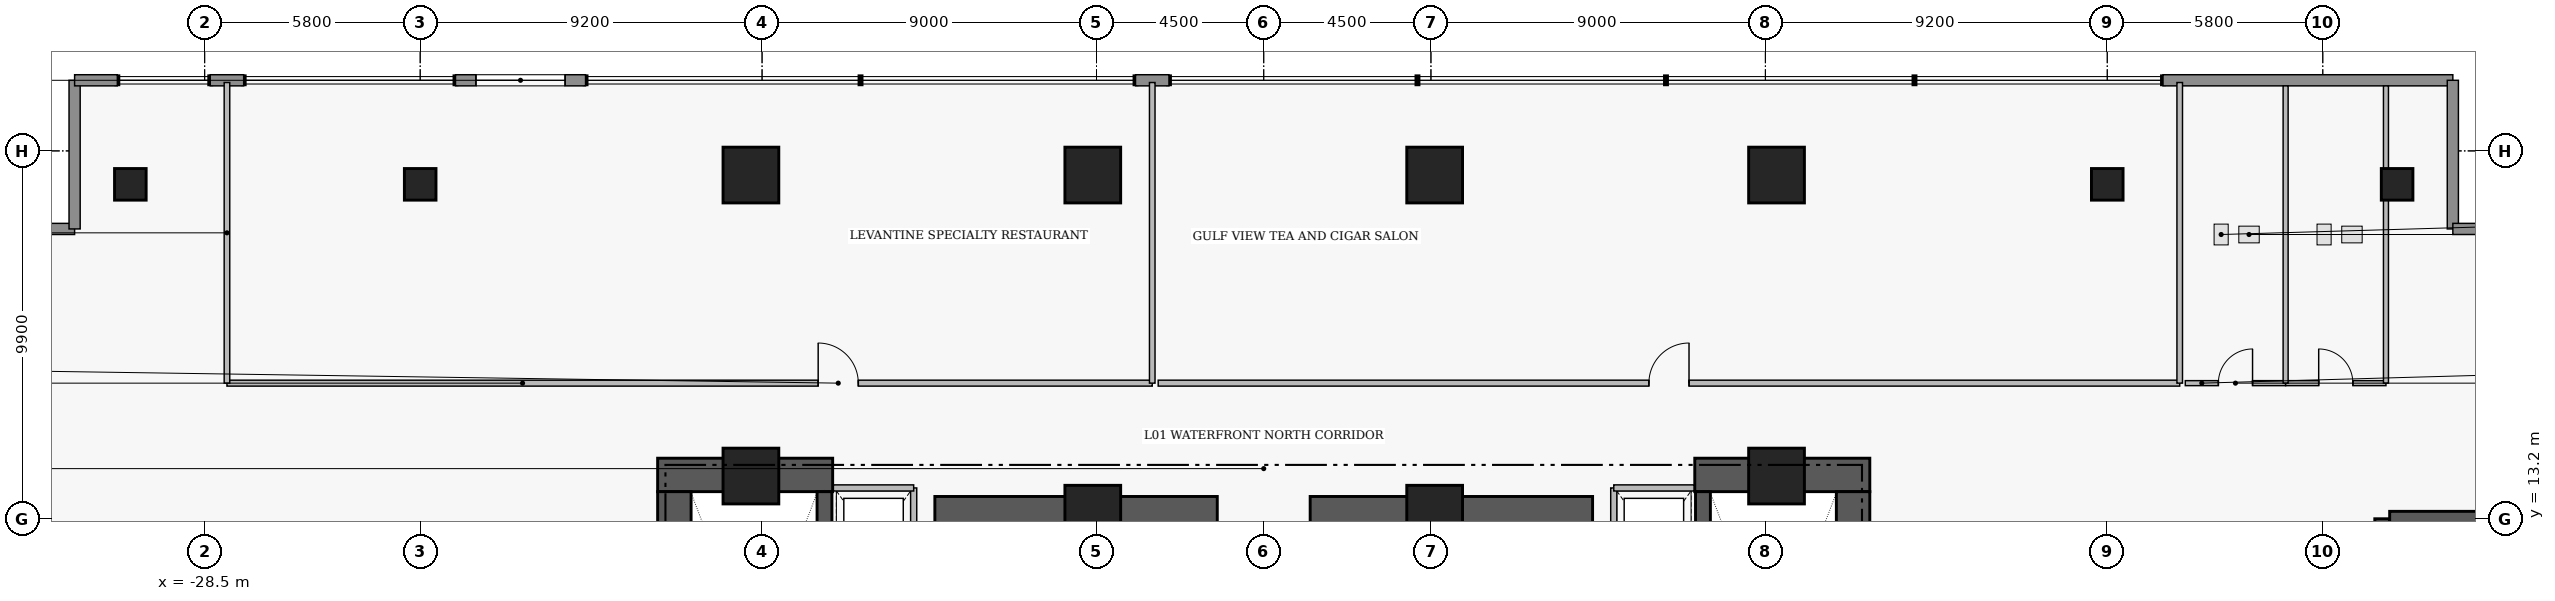
"""IFC4 building model, lengths in metres.
Left out: names, types, materials, properties, quantities, classifications, styles, units other than length and angle.
Written with IfcOpenShell. Run it as: python <this file> out.ifc"""

import sys

from ifc_helpers import new_model, si_unit, direction, frame, frame_2d, origin, origin_2d, place, context, subcontext, project, spatial, rectangle, extrude, element, fill, save


model = new_model("IFC4")
c1 = context("Model", 3, precision=1e-05, world=origin(), true_north=direction((0.0, 1.0)))
c2 = subcontext(c1, "Body", "Model", "MODEL_VIEW")
j1 = project(units=[si_unit("LENGTHUNIT", "METRE"), si_unit("PLANEANGLEUNIT", "RADIAN")], contexts=[c1])
p1 = place(None, origin())
s1 = spatial("IfcSite", under=j1, at=p1, CompositionType="ELEMENT")
p2 = place(p1, origin())
s2 = spatial("IfcBuilding", under=s1, at=p2, CompositionType="ELEMENT")
p3 = place(p2, frame((0.0, 0.0, 6.0)))
s3 = spatial("IfcBuildingStorey", under=s2, at=p3, CompositionType="ELEMENT", Elevation=6.0)
for number, where, z_axis, x_axis in (
    (1, (-16.31, 14.38, 0.0), (0.0, 0.0, 1.0), (1.0, 0.0, 0.0)),
    (2, (11.6, 14.38, 0.0), (0.0, 0.0, 1.0), (1.0, 0.0, 0.0)),
):
    element("IfcWall", number, at=place(p3, frame(where, z_axis=z_axis, x_axis=x_axis)), inside=s3, PredefinedType="SHEAR", context=c2, shape_type="SweptSolid", body=[
        extrude(rectangle(XDim=4.71, YDim=0.9, at=frame_2d((2.355, 0.0))), origin(), (0.0, 0.0, 1.0), 5.21),
    ])
for number, where, z_axis, x_axis in (
    (3, (-15.86, 4.97, 0.0), (0.0, 0.0, 1.0), (0.0, 1.0, 0.0)),
    (4, (15.86, 4.97, 0.0), (0.0, 0.0, 1.0), (0.0, 1.0, 0.0)),
):
    element("IfcWall", number, at=place(p3, frame(where, z_axis=z_axis, x_axis=x_axis)), inside=s3, PredefinedType="SHEAR", context=c2, shape_type="SweptSolid", body=[
        extrude(rectangle(XDim=8.96, YDim=0.9, at=frame_2d((4.48, 0.0))), origin(), (0.0, 0.0, 1.0), 5.21),
    ])
for number, where, z_axis, x_axis in (
    (5, (-8.85, 13.35, 0.0), (0.0, 0.0, 1.0), (1.0, 0.0, 0.0)),
    (6, (1.25, 13.35, 0.0), (0.0, 0.0, 1.0), (1.0, 0.0, 0.0)),
):
    element("IfcWall", number, at=place(p3, frame(where, z_axis=z_axis, x_axis=x_axis)), inside=s3, PredefinedType="SHEAR", context=c2, shape_type="SweptSolid", body=[
        extrude(rectangle(XDim=7.6, YDim=0.9, at=frame_2d((3.8, 0.0))), origin(), (0.0, 0.0, 1.0), 5.14),
    ])
p4 = place(p3, frame((-11.82, 4.97, 0.0), z_axis=(0.0, 0.0, 1.0), x_axis=(0.0, 1.0, 0.0)))
e7 = element("IfcWall", 7, at=p4, inside=s3, PredefinedType="SHEAR", context=c2, shape_type="SweptSolid", body=[
    extrude(rectangle(XDim=8.96, YDim=0.4, at=frame_2d((4.48, 0.0))), origin(), (0.0, 0.0, 1.0), 5.21),
])
p5 = place(p4, frame((0.31, 0.0, 0.0)))
e8 = element("IfcOpeningElement", 8, at=p5, cuts=e7, PredefinedType="OPENING", context=c2, shape_type="SweptSolid", body=[
    extrude(rectangle(XDim=1.12, YDim=2.22, at=frame_2d((0.56, 1.11))), frame((0.0, 0.21, 0.0), z_axis=(0.0, -1.0, 0.0), x_axis=(1.0, 0.0, 0.0)), (0.0, 0.0, 1.0), 0.42),
])
p6 = place(p3, frame((11.82, 13.93, 0.0), z_axis=(0.0, 0.0, 1.0), x_axis=(0.0, -1.0, 0.0)))
e9 = element("IfcWall", 9, at=p6, inside=s3, PredefinedType="SHEAR", context=c2, shape_type="SweptSolid", body=[
    extrude(rectangle(XDim=8.96, YDim=0.4, at=frame_2d((4.48, 0.0))), origin(), (0.0, 0.0, 1.0), 5.21),
])
p7 = place(p6, frame((7.53, 0.0, 0.0)))
e10 = element("IfcOpeningElement", 10, at=p7, cuts=e9, PredefinedType="OPENING", context=c2, shape_type="SweptSolid", body=[
    extrude(rectangle(XDim=1.12, YDim=2.22, at=frame_2d((0.56, 1.11))), frame((0.0, 0.21, 0.0), z_axis=(0.0, -1.0, 0.0), x_axis=(1.0, 0.0, 0.0)), (0.0, 0.0, 1.0), 0.42),
])
p8 = place(p3, frame((30.1, 13.2, 0.0), z_axis=(0.0, 0.0, 1.0), x_axis=(0.0, -1.0, 0.0)))
e11 = element("IfcWall", 11, at=p8, inside=s3, PredefinedType="SHEAR", context=c2, shape_type="SweptSolid", body=[
    extrude(rectangle(XDim=11.8, YDim=0.4, at=frame_2d((5.9, 0.0))), origin(), (0.0, 0.0, 1.0), 5.21),
])
p9 = place(p8, frame((9.7, 0.0, 0.0)))
e12 = element("IfcOpeningElement", 12, at=p9, cuts=e11, PredefinedType="OPENING", context=c2, shape_type="SweptSolid", body=[
    extrude(rectangle(XDim=1.12, YDim=2.22, at=frame_2d((0.56, 1.11))), frame((0.0, 0.21, 0.0), z_axis=(0.0, -1.0, 0.0), x_axis=(1.0, 0.0, 0.0)), (0.0, 0.0, 1.0), 0.42),
])
p10 = place(p3, frame((30.3, 13.2, 0.0), z_axis=(0.0, 0.0, 1.0), x_axis=(1.0, 0.0, 0.0)))
e13 = element("IfcWall", 13, at=p10, inside=s3, PredefinedType="SHEAR", context=c2, shape_type="SweptSolid", body=[
    extrude(rectangle(XDim=5.35, YDim=0.4, at=frame_2d((2.675, 0.0))), origin(), (0.0, 0.0, 1.0), 5.21),
])
for number, where, z_axis, x_axis in (
    (14, (-13.8, 14.35, 0.0), (0.0, 0.0, 1.0), (1.0, 0.0, 0.0)),
    (15, (-4.6, 13.35, 0.0), (0.0, 0.0, 1.0), (1.0, 0.0, 0.0)),
    (16, (4.6, 13.35, 0.0), (0.0, 0.0, 1.0), (1.0, 0.0, 0.0)),
    (17, (13.8, 14.35, 0.0), (0.0, 0.0, 1.0), (1.0, 0.0, 0.0)),
    (18, (-13.8, 22.45, 0.0), (0.0, 0.0, 1.0), (1.0, 0.0, 0.0)),
    (19, (-4.6, 22.45, 0.0), (0.0, 0.0, 1.0), (1.0, 0.0, 0.0)),
    (20, (4.6, 22.45, 0.0), (0.0, 0.0, 1.0), (1.0, 0.0, 0.0)),
    (21, (13.8, 22.45, 0.0), (0.0, 0.0, 1.0), (1.0, 0.0, 0.0)),
):
    element("IfcColumn", number, at=place(p3, frame(where, z_axis=z_axis, x_axis=x_axis)), inside=s3, PredefinedType="COLUMN", context=c2, shape_type="SweptSolid", body=[
        extrude(rectangle(XDim=1.5, YDim=1.5, at=origin_2d()), origin(), (0.0, 0.0, 1.0), 5.4),
    ])
for number, where, z_axis, x_axis in (
    (22, (-30.5, 22.2, 0.0), (0.0, 0.0, 1.0), (1.0, 0.0, 0.0)),
    (23, (30.5, 22.2, 0.0), (0.0, 0.0, 1.0), (1.0, 0.0, 0.0)),
    (24, (-22.7, 22.2, 0.0), (0.0, 0.0, 1.0), (1.0, 0.0, 0.0)),
    (25, (22.7, 22.2, 0.0), (0.0, 0.0, 1.0), (1.0, 0.0, 0.0)),
):
    element("IfcColumn", number, at=place(p3, frame(where, z_axis=z_axis, x_axis=x_axis)), inside=s3, PredefinedType="COLUMN", context=c2, shape_type="SweptSolid", body=[
        extrude(rectangle(XDim=0.85, YDim=0.85, at=origin_2d()), origin(), (0.0, 0.0, 1.0), 5.4),
    ])
for number, where, z_axis, x_axis in (
    (26, (-36.0, 21.0, 0.0), (0.0, 0.0, 1.0), (1.0, 0.0, 0.0)),
    (27, (-32.0, 21.0, 0.0), (0.0, 0.0, 1.0), (0.0, 1.0, 0.0)),
):
    element("IfcWall", number, at=place(p3, frame(where, z_axis=z_axis, x_axis=x_axis)), inside=s3, PredefinedType="STANDARD", context=c2, shape_type="SweptSolid", body=[
        extrude(rectangle(XDim=4.0, YDim=0.3, at=frame_2d((2.0, 0.0))), origin(), (0.0, 0.0, 1.0), 5.14),
    ])
p11 = place(p3, frame((-32.0, 25.0, 0.0), z_axis=(0.0, 0.0, 1.0), x_axis=(1.0, 0.0, 0.0)))
e28 = element("IfcWall", 28, at=p11, inside=s3, PredefinedType="STANDARD", context=c2, shape_type="SweptSolid", body=[
    extrude(rectangle(XDim=1.15, YDim=0.3, at=frame_2d((0.575, 0.0))), origin(), (0.0, 0.0, 1.0), 5.14),
])
p12 = place(p3, frame((-28.35, 25.0, 0.0), z_axis=(0.0, 0.0, 1.0), x_axis=(1.0, 0.0, 0.0)))
e29 = element("IfcWall", 29, at=p12, inside=s3, PredefinedType="STANDARD", context=c2, shape_type="SweptSolid", body=[
    extrude(rectangle(XDim=0.9, YDim=0.3, at=frame_2d((0.45, 0.0))), origin(), (0.0, 0.0, 1.0), 5.14),
])
p13 = place(p3, frame((-21.75, 25.0, 0.0), z_axis=(0.0, 0.0, 1.0), x_axis=(1.0, 0.0, 0.0)))
e30 = element("IfcWall", 30, at=p13, inside=s3, PredefinedType="STANDARD", context=c2, shape_type="SweptSolid", body=[
    extrude(rectangle(XDim=3.5, YDim=0.3, at=frame_2d((1.75, 0.0))), origin(), (0.0, 0.0, 1.0), 5.14),
])
p14 = place(p13, frame((0.55, 0.0, 0.9)))
e31 = element("IfcOpeningElement", 31, at=p14, cuts=e30, PredefinedType="OPENING", context=c2, shape_type="SweptSolid", body=[
    extrude(rectangle(XDim=2.4, YDim=2.2, at=frame_2d((1.2, 1.1))), frame((0.0, 0.16, 0.0), z_axis=(0.0, -1.0, 0.0), x_axis=(1.0, 0.0, 0.0)), (0.0, 0.0, 1.0), 0.32),
])
p15 = place(p3, frame((-3.45, 25.0, 0.0), z_axis=(0.0, 0.0, 1.0), x_axis=(1.0, 0.0, 0.0)))
e32 = element("IfcWall", 32, at=p15, inside=s3, PredefinedType="STANDARD", context=c2, shape_type="SweptSolid", body=[
    extrude(rectangle(XDim=0.9, YDim=0.3, at=frame_2d((0.45, 0.0))), origin(), (0.0, 0.0, 1.0), 5.14),
])
p16 = place(p3, frame((24.2, 25.0, 0.0), z_axis=(0.0, 0.0, 1.0), x_axis=(1.0, 0.0, 0.0)))
e33 = element("IfcWall", 33, at=p16, inside=s3, PredefinedType="STANDARD", context=c2, shape_type="SweptSolid", body=[
    extrude(rectangle(XDim=7.8, YDim=0.3, at=frame_2d((3.9, 0.0))), origin(), (0.0, 0.0, 1.0), 5.14),
])
for number, where, z_axis, x_axis in (
    (34, (32.0, 25.0, 0.0), (0.0, 0.0, 1.0), (0.0, -1.0, 0.0)),
    (35, (32.0, 21.0, 0.0), (0.0, 0.0, 1.0), (1.0, 0.0, 0.0)),
):
    element("IfcWall", number, at=place(p3, frame(where, z_axis=z_axis, x_axis=x_axis)), inside=s3, PredefinedType="STANDARD", context=c2, shape_type="SweptSolid", body=[
        extrude(rectangle(XDim=4.0, YDim=0.3, at=frame_2d((2.0, 0.0))), origin(), (0.0, 0.0, 1.0), 5.14),
    ])
p17 = place(p3, frame((-27.9, 16.85, 0.0), z_axis=(0.0, 0.0, 1.0), x_axis=(1.0, 0.0, 0.0)))
e36 = element("IfcWall", 36, at=p17, inside=s3, PredefinedType="PARTITIONING", context=c2, shape_type="SweptSolid", body=[
    extrude(rectangle(XDim=24.9, YDim=0.16, at=frame_2d((12.45, 0.0))), origin(), (0.0, 0.0, 1.0), 4.607),
])
p18 = place(p17, frame((15.91, 0.0, 0.0)))
e37 = element("IfcOpeningElement", 37, at=p18, cuts=e36, PredefinedType="OPENING", context=c2, shape_type="SweptSolid", body=[
    extrude(rectangle(XDim=1.08, YDim=2.18, at=frame_2d((0.54, 1.09))), frame((0.0, 0.09, 0.0), z_axis=(0.0, -1.0, 0.0), x_axis=(1.0, 0.0, 0.0)), (0.0, 0.0, 1.0), 0.18),
])
p19 = place(p3, frame((-2.84, 16.85, 0.0), z_axis=(0.0, 0.0, 1.0), x_axis=(1.0, 0.0, 0.0)))
e38 = element("IfcWall", 38, at=p19, inside=s3, PredefinedType="PARTITIONING", context=c2, shape_type="SweptSolid", body=[
    extrude(rectangle(XDim=27.49, YDim=0.16, at=frame_2d((13.745, 0.0))), origin(), (0.0, 0.0, 1.0), 4.607),
])
p20 = place(p19, frame((13.205, 0.0, 0.0)))
e39 = element("IfcOpeningElement", 39, at=p20, cuts=e38, PredefinedType="OPENING", context=c2, shape_type="SweptSolid", body=[
    extrude(rectangle(XDim=1.08, YDim=2.18, at=frame_2d((0.54, 1.09))), frame((0.0, 0.09, 0.0), z_axis=(0.0, -1.0, 0.0), x_axis=(1.0, 0.0, 0.0)), (0.0, 0.0, 1.0), 0.18),
])
p21 = place(p3, frame((24.8, 16.85, 0.0), z_axis=(0.0, 0.0, 1.0), x_axis=(1.0, 0.0, 0.0)))
e40 = element("IfcWall", 40, at=p21, inside=s3, PredefinedType="PLUMBINGWALL", context=c2, shape_type="SweptSolid", body=[
    extrude(rectangle(XDim=2.7, YDim=0.135, at=frame_2d((1.35, 0.0))), origin(), (0.0, 0.0, 1.0), 5.14),
])
p22 = place(p21, frame((0.89, 0.0, 0.0)))
e41 = element("IfcOpeningElement", 41, at=p22, cuts=e40, PredefinedType="OPENING", context=c2, shape_type="SweptSolid", body=[
    extrude(rectangle(XDim=0.92, YDim=2.12, at=frame_2d((0.46, 1.06))), frame((0.0, 0.077, 0.0), z_axis=(0.0, -1.0, 0.0), x_axis=(1.0, 0.0, 0.0)), (0.0, 0.0, 1.0), 0.155),
])
p23 = place(p3, frame((27.5, 16.85, 0.0), z_axis=(0.0, 0.0, 1.0), x_axis=(1.0, 0.0, 0.0)))
e42 = element("IfcWall", 42, at=p23, inside=s3, PredefinedType="PLUMBINGWALL", context=c2, shape_type="SweptSolid", body=[
    extrude(rectangle(XDim=2.7, YDim=0.135, at=frame_2d((1.35, 0.0))), origin(), (0.0, 0.0, 1.0), 5.14),
])
p24 = place(p23, frame((0.89, 0.0, 0.0)))
e43 = element("IfcOpeningElement", 43, at=p24, cuts=e42, PredefinedType="OPENING", context=c2, shape_type="SweptSolid", body=[
    extrude(rectangle(XDim=0.92, YDim=2.12, at=frame_2d((0.46, 1.06))), frame((0.0, 0.077, 0.0), z_axis=(0.0, -1.0, 0.0), x_axis=(1.0, 0.0, 0.0)), (0.0, 0.0, 1.0), 0.155),
])
p25 = place(p3, frame((-9.42, 11.07, 0.0), z_axis=(0.0, 0.0, 1.0), x_axis=(0.0, 1.0, 0.0)))
e44 = element("IfcWall", 44, at=p25, inside=s3, PredefinedType="PARTITIONING", context=c2, shape_type="SweptSolid", body=[
    extrude(rectangle(XDim=2.96, YDim=0.165, at=frame_2d((1.48, 0.0))), origin(), (0.0, 0.0, 1.0), 5.14),
])
p26 = place(p3, frame((-11.58, 14.03, 0.0), z_axis=(0.0, 0.0, 1.0), x_axis=(1.0, 0.0, 0.0)))
e45 = element("IfcWall", 45, at=p26, inside=s3, PredefinedType="PARTITIONING", context=c2, shape_type="SweptSolid", body=[
    extrude(rectangle(XDim=2.16, YDim=0.165, at=frame_2d((1.08, 0.0))), origin(), (0.0, 0.0, 1.0), 5.14),
])
p27 = place(p3, frame((9.42, 11.07, 0.0), z_axis=(0.0, 0.0, 1.0), x_axis=(0.0, 1.0, 0.0)))
e46 = element("IfcWall", 46, at=p27, inside=s3, PredefinedType="PARTITIONING", context=c2, shape_type="SweptSolid", body=[
    extrude(rectangle(XDim=2.96, YDim=0.165, at=frame_2d((1.48, 0.0))), origin(), (0.0, 0.0, 1.0), 5.14),
])
p28 = place(p3, frame((9.42, 14.03, 0.0), z_axis=(0.0, 0.0, 1.0), x_axis=(1.0, 0.0, 0.0)))
e47 = element("IfcWall", 47, at=p28, inside=s3, PredefinedType="PARTITIONING", context=c2, shape_type="SweptSolid", body=[
    extrude(rectangle(XDim=2.16, YDim=0.165, at=frame_2d((1.08, 0.0))), origin(), (0.0, 0.0, 1.0), 5.14),
])
for number, where, z_axis, x_axis in (
    (48, (-27.9, 16.85, 0.0), (0.0, 0.0, 1.0), (0.0, 1.0, 0.0)),
    (49, (-3.0, 16.85, 0.0), (0.0, 0.0, 1.0), (0.0, 1.0, 0.0)),
    (50, (24.65, 16.85, 0.0), (0.0, 0.0, 1.0), (0.0, 1.0, 0.0)),
):
    element("IfcWall", number, at=place(p3, frame(where, z_axis=z_axis, x_axis=x_axis)), inside=s3, PredefinedType="PARTITIONING", context=c2, shape_type="SweptSolid", body=[
        extrude(rectangle(XDim=8.09, YDim=0.15, at=frame_2d((4.045, 0.0))), origin(), (0.0, 0.0, 1.0), 5.14),
    ])
for number, where, z_axis, x_axis in (
    (51, (30.2, 16.85, 0.0), (0.0, 0.0, 1.0), (0.0, 1.0, 0.0)),
    (52, (27.5, 16.85, 0.0), (0.0, 0.0, 1.0), (0.0, 1.0, 0.0)),
):
    element("IfcWall", number, at=place(p3, frame(where, z_axis=z_axis, x_axis=x_axis)), inside=s3, PredefinedType="PLUMBINGWALL", context=c2, shape_type="SweptSolid", body=[
        extrude(rectangle(XDim=8.0, YDim=0.135, at=frame_2d((4.0, 0.0))), origin(), (0.0, 0.0, 1.0), 5.14),
    ])
p29 = place(p14, origin())
e53 = element("IfcWindow", 53, at=p29, inside=s3, PartitioningType="SINGLE_PANEL", PredefinedType="WINDOW", context=c2, shape_type="SweptSolid", body=[
    extrude(rectangle(XDim=2.4, YDim=2.2, at=frame_2d((1.2, 1.1))), frame((0.0, 0.03, 0.0), z_axis=(0.0, -1.0, 0.0), x_axis=(1.0, 0.0, 0.0)), (0.0, 0.0, 1.0), 0.06),
])
fill(e31, e53)
p30 = place(p18, origin())
e54 = element("IfcDoor", 54, at=p30, inside=s3, OperationType="SINGLE_SWING_LEFT", PredefinedType="DOOR", context=c2, shape_type="SweptSolid", body=[
    extrude(rectangle(XDim=1.08, YDim=2.18, at=frame_2d((0.54, 1.09))), frame((0.0, 0.025, 0.0), z_axis=(0.0, -1.0, 0.0), x_axis=(1.0, 0.0, 0.0)), (0.0, 0.0, 1.0), 0.05),
])
fill(e37, e54)
p31 = place(p20, origin())
e55 = element("IfcDoor", 55, at=p31, inside=s3, OperationType="SINGLE_SWING_RIGHT", PredefinedType="DOOR", context=c2, shape_type="SweptSolid", body=[
    extrude(rectangle(XDim=1.08, YDim=2.18, at=frame_2d((0.54, 1.09))), frame((0.0, 0.025, 0.0), z_axis=(0.0, -1.0, 0.0), x_axis=(1.0, 0.0, 0.0)), (0.0, 0.0, 1.0), 0.05),
])
fill(e39, e55)
p32 = place(p22, origin())
e56 = element("IfcDoor", 56, at=p32, inside=s3, OperationType="SINGLE_SWING_RIGHT", PredefinedType="DOOR", context=c2, shape_type="SweptSolid", body=[
    extrude(rectangle(XDim=0.92, YDim=2.12, at=frame_2d((0.46, 1.06))), frame((0.0, 0.025, 0.0), z_axis=(0.0, -1.0, 0.0), x_axis=(1.0, 0.0, 0.0)), (0.0, 0.0, 1.0), 0.05),
])
fill(e41, e56)
p33 = place(p24, origin())
e57 = element("IfcDoor", 57, at=p33, inside=s3, OperationType="SINGLE_SWING_LEFT", PredefinedType="DOOR", context=c2, shape_type="SweptSolid", body=[
    extrude(rectangle(XDim=0.92, YDim=2.12, at=frame_2d((0.46, 1.06))), frame((0.0, 0.025, 0.0), z_axis=(0.0, -1.0, 0.0), x_axis=(1.0, 0.0, 0.0)), (0.0, 0.0, 1.0), 0.05),
])
fill(e43, e57)
save(model, sys.argv[1])
